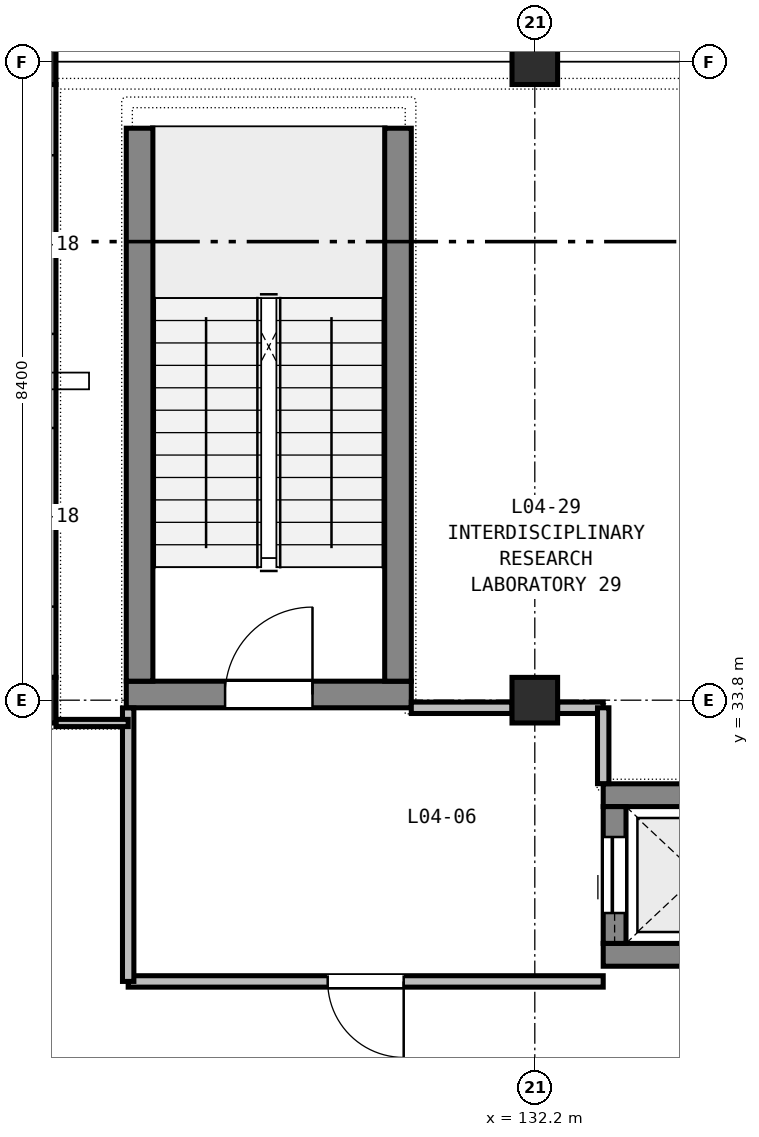
"""IFC4 building model, lengths in metres.
Left out: names, types, materials, properties, quantities, classifications, styles, units other than length and angle.
Written with IfcOpenShell. Run it as: python <this file> out.ifc"""

import sys

from ifc_helpers import new_model, si_unit, direction, frame, frame_2d, origin, origin_2d, place, context, subcontext, project, spatial, rectangle, extrude, element, fill, save


model = new_model("IFC4")
c1 = context("Model", 3, precision=1e-05, world=origin(), true_north=direction((0.0, 1.0)))
c2 = subcontext(c1, "Body", "Model", "MODEL_VIEW")
j1 = project(units=[si_unit("LENGTHUNIT", "METRE"), si_unit("PLANEANGLEUNIT", "RADIAN")], contexts=[c1])
p1 = place(None, origin())
s1 = spatial("IfcSite", under=j1, at=p1, CompositionType="ELEMENT")
p2 = place(p1, origin())
s2 = spatial("IfcBuilding", under=s1, at=p2, CompositionType="ELEMENT")
p3 = place(p2, frame((0.0, 0.0, 19.5)))
s3 = spatial("IfcBuildingStorey", under=s2, at=p3, CompositionType="ELEMENT", Elevation=19.5)
for number, where, z_axis, x_axis in (
    (1, (125.6, 33.8, 0.0), (0.0, 0.0, 1.0), (1.0, 0.0, 0.0)),
    (2, (125.6, 42.2, 0.0), (0.0, 0.0, 1.0), (1.0, 0.0, 0.0)),
    (3, (132.2, 33.8, 0.0), (0.0, 0.0, 1.0), (1.0, 0.0, 0.0)),
    (4, (132.2, 42.2, 0.0), (0.0, 0.0, 1.0), (1.0, 0.0, 0.0)),
):
    element("IfcColumn", number, at=place(p3, frame(where, z_axis=z_axis, x_axis=x_axis)), inside=s3, PredefinedType="COLUMN", context=c2, shape_type="SweptSolid", body=[
        extrude(rectangle(XDim=0.6, YDim=0.6, at=origin_2d()), origin(), (0.0, 0.0, 1.0), 4.5),
    ])
p4 = place(p3, frame((126.825, 33.875, 0.0), z_axis=(0.0, 0.0, 1.0), x_axis=(1.0, 0.0, 0.0)))
e5 = element("IfcWall", 5, at=p4, inside=s3, PredefinedType="SHEAR", context=c2, shape_type="SweptSolid", body=[
    extrude(rectangle(XDim=3.75, YDim=0.35, at=frame_2d((1.875, 0.0))), origin(), (0.0, 0.0, 1.0), 4.5),
])
p5 = place(p4, frame((1.3, 0.0, 0.0)))
e6 = element("IfcOpeningElement", 6, at=p5, cuts=e5, PredefinedType="OPENING", context=c2, shape_type="SweptSolid", body=[
    extrude(rectangle(XDim=1.15, YDim=2.15, at=frame_2d((0.575, 1.075))), frame((0.0, 0.185, 0.0), z_axis=(0.0, -1.0, 0.0), x_axis=(1.0, 0.0, 0.0)), (0.0, 0.0, 1.0), 0.37),
])
p6 = place(p3, frame((126.825, 41.5, 0.0), z_axis=(0.0, 0.0, 1.0), x_axis=(1.0, 0.0, 0.0)))
e7 = element("IfcWall", 7, at=p6, inside=s3, PredefinedType="SHEAR", context=c2, shape_type="SweptSolid", body=[
    extrude(rectangle(XDim=3.75, YDim=0.35, at=frame_2d((1.875, 0.0))), origin(), (0.0, 0.0, 1.0), 4.5),
])
for number, where, z_axis, x_axis in (
    (8, (127.0, 34.05, 0.0), (0.0, 0.0, 1.0), (0.0, 1.0, 0.0)),
    (9, (130.4, 34.05, 0.0), (0.0, 0.0, 1.0), (0.0, 1.0, 0.0)),
):
    element("IfcWall", number, at=place(p3, frame(where, z_axis=z_axis, x_axis=x_axis)), inside=s3, PredefinedType="SHEAR", context=c2, shape_type="SweptSolid", body=[
        extrude(rectangle(XDim=7.275, YDim=0.35, at=frame_2d((3.637, 0.0))), origin(), (0.0, 0.0, 1.0), 4.5),
    ])
for number, where, z_axis, x_axis in (
    (10, (133.1, 30.45, 0.0), (0.0, 0.0, 1.0), (1.0, 0.0, 0.0)),
    (11, (133.1, 32.55, 0.0), (0.0, 0.0, 1.0), (1.0, 0.0, 0.0)),
):
    element("IfcWall", number, at=place(p3, frame(where, z_axis=z_axis, x_axis=x_axis)), inside=s3, PredefinedType="SHEAR", context=c2, shape_type="SweptSolid", body=[
        extrude(rectangle(XDim=2.5, YDim=0.3, at=frame_2d((1.25, 0.0))), origin(), (0.0, 0.0, 1.0), 4.5),
    ])
p7 = place(p3, frame((133.25, 30.6, 0.0), z_axis=(0.0, 0.0, 1.0), x_axis=(0.0, 1.0, 0.0)))
e12 = element("IfcWall", 12, at=p7, inside=s3, PredefinedType="SHEAR", context=c2, shape_type="SweptSolid", body=[
    extrude(rectangle(XDim=1.8, YDim=0.3, at=frame_2d((0.9, 0.0))), origin(), (0.0, 0.0, 1.0), 4.5),
])
p8 = place(p7, frame((0.4, 0.0, 0.0)))
e13 = element("IfcOpeningElement", 13, at=p8, cuts=e12, PredefinedType="OPENING", context=c2, shape_type="SweptSolid", body=[
    extrude(rectangle(XDim=1.0, YDim=2.1, at=frame_2d((0.5, 1.05))), frame((0.0, 0.16, 0.0), z_axis=(0.0, -1.0, 0.0), x_axis=(1.0, 0.0, 0.0)), (0.0, 0.0, 1.0), 0.32),
])
p9 = place(p3, frame((125.75, 34.1, 0.0), z_axis=(0.0, 0.0, 1.0), x_axis=(0.0, 1.0, 0.0)))
e14 = element("IfcWall", 14, at=p9, inside=s3, PredefinedType="STANDARD", context=c2, shape_type="SweptSolid", body=[
    extrude(rectangle(XDim=7.8, YDim=0.3, at=frame_2d((3.9, 0.0))), origin(), (0.0, 0.0, 1.0), 3.735),
])
p10 = place(p9, frame((0.931, 0.0, 0.9)))
e15 = element("IfcOpeningElement", 15, at=p10, cuts=e14, PredefinedType="OPENING", context=c2, shape_type="SweptSolid", body=[
    extrude(rectangle(XDim=2.35, YDim=1.5, at=frame_2d((1.175, 0.75))), frame((0.0, 0.16, 0.0), z_axis=(0.0, -1.0, 0.0), x_axis=(1.0, 0.0, 0.0)), (0.0, 0.0, 1.0), 0.32),
])
p11 = place(p9, frame((4.519, 0.0, 0.9)))
e16 = element("IfcOpeningElement", 16, at=p11, cuts=e14, PredefinedType="OPENING", context=c2, shape_type="SweptSolid", body=[
    extrude(rectangle(XDim=2.35, YDim=1.5, at=frame_2d((1.175, 0.75))), frame((0.0, 0.16, 0.0), z_axis=(0.0, -1.0, 0.0), x_axis=(1.0, 0.0, 0.0)), (0.0, 0.0, 1.0), 0.32),
])
p12 = place(p3, frame((125.6, 42.05, 0.0), z_axis=(0.0, 0.0, 1.0), x_axis=(1.0, 0.0, 0.0)))
e17 = element("IfcWall", 17, at=p12, inside=s3, PredefinedType="STANDARD", context=c2, shape_type="SweptSolid", body=[
    extrude(rectangle(XDim=6.6, YDim=0.3, at=frame_2d((3.3, 0.0))), origin(), (0.0, 0.0, 1.0), 3.735),
])
p13 = place(p12, frame((1.132, 0.0, 0.75)))
e18 = element("IfcOpeningElement", 18, at=p13, cuts=e17, PredefinedType="OPENING", context=c2, shape_type="SweptSolid", body=[
    extrude(rectangle(XDim=1.3, YDim=2.4, at=frame_2d((0.65, 1.2))), frame((0.0, 0.16, 0.0), z_axis=(0.0, -1.0, 0.0), x_axis=(1.0, 0.0, 0.0)), (0.0, 0.0, 1.0), 0.32),
])
p14 = place(p12, frame((4.168, 0.0, 0.75)))
e19 = element("IfcOpeningElement", 19, at=p14, cuts=e17, PredefinedType="OPENING", context=c2, shape_type="SweptSolid", body=[
    extrude(rectangle(XDim=1.3, YDim=2.4, at=frame_2d((0.65, 1.2))), frame((0.0, 0.16, 0.0), z_axis=(0.0, -1.0, 0.0), x_axis=(1.0, 0.0, 0.0)), (0.0, 0.0, 1.0), 0.32),
])
p15 = place(p3, frame((132.2, 42.05, 0.0), z_axis=(0.0, 0.0, 1.0), x_axis=(1.0, 0.0, 0.0)))
e20 = element("IfcWall", 20, at=p15, inside=s3, PredefinedType="STANDARD", context=c2, shape_type="SweptSolid", body=[
    extrude(rectangle(XDim=3.0, YDim=0.3, at=frame_2d((1.5, 0.0))), origin(), (0.0, 0.0, 1.0), 3.735),
])
p16 = place(p3, frame((130.575, 33.7, 0.0), z_axis=(0.0, 0.0, 1.0), x_axis=(1.0, 0.0, 0.0)))
e21 = element("IfcWall", 21, at=p16, inside=s3, PredefinedType="PARTITIONING", context=c2, shape_type="SweptSolid", body=[
    extrude(rectangle(XDim=1.325, YDim=0.15, at=frame_2d((0.663, 0.0))), origin(), (0.0, 0.0, 1.0), 3.885),
])
p17 = place(p3, frame((132.5, 33.7, 0.0), z_axis=(0.0, 0.0, 1.0), x_axis=(1.0, 0.0, 0.0)))
e22 = element("IfcWall", 22, at=p17, inside=s3, PredefinedType="PARTITIONING", context=c2, shape_type="SweptSolid", body=[
    extrude(rectangle(XDim=0.6, YDim=0.15, at=frame_2d((0.3, 0.0))), origin(), (0.0, 0.0, 1.0), 3.885),
])
p18 = place(p3, frame((133.1, 33.7, 0.0), z_axis=(0.0, 0.0, 1.0), x_axis=(0.0, -1.0, 0.0)))
e23 = element("IfcWall", 23, at=p18, inside=s3, PredefinedType="PARTITIONING", context=c2, shape_type="SweptSolid", body=[
    extrude(rectangle(XDim=0.998, YDim=0.15, at=frame_2d((0.499, 0.0))), origin(), (0.0, 0.0, 1.0), 3.885),
])
p19 = place(p3, frame((133.1, 30.1, 0.0), z_axis=(0.0, 0.0, 1.0), x_axis=(-1.0, 0.0, 0.0)))
e24 = element("IfcWall", 24, at=p19, inside=s3, PredefinedType="PARTITIONING", context=c2, shape_type="SweptSolid", body=[
    extrude(rectangle(XDim=6.25, YDim=0.15, at=frame_2d((3.125, 0.0))), origin(), (0.0, 0.0, 1.0), 3.735),
])
p20 = place(p19, frame((2.625, 0.0, 0.0)))
e25 = element("IfcOpeningElement", 25, at=p20, cuts=e24, PredefinedType="OPENING", context=c2, shape_type="SweptSolid", body=[
    extrude(rectangle(XDim=1.0, YDim=2.1, at=frame_2d((0.5, 1.05))), frame((0.0, 0.085, 0.0), z_axis=(0.0, -1.0, 0.0), x_axis=(1.0, 0.0, 0.0)), (0.0, 0.0, 1.0), 0.17),
])
p21 = place(p3, frame((126.85, 30.1, 0.0), z_axis=(0.0, 0.0, 1.0), x_axis=(0.0, 1.0, 0.0)))
e26 = element("IfcWall", 26, at=p21, inside=s3, PredefinedType="PARTITIONING", context=c2, shape_type="SweptSolid", body=[
    extrude(rectangle(XDim=3.598, YDim=0.15, at=frame_2d((1.799, 0.0))), origin(), (0.0, 0.0, 1.0), 3.885),
])
p22 = place(p3, frame((126.85, 33.5, 0.0), z_axis=(0.0, 0.0, 1.0), x_axis=(-1.0, 0.0, 0.0)))
e27 = element("IfcWall", 27, at=p22, inside=s3, PredefinedType="PARTITIONING", context=c2, shape_type="SweptSolid", body=[
    extrude(rectangle(XDim=0.95, YDim=0.095, at=frame_2d((0.475, 0.0))), origin(), (0.0, 0.0, 1.0), 3.735),
])
p23 = place(p13, origin())
e28 = element("IfcWindow", 28, at=p23, inside=s3, PartitioningType="SINGLE_PANEL", PredefinedType="WINDOW", context=c2, shape_type="SweptSolid", body=[
    extrude(rectangle(XDim=1.3, YDim=2.4, at=frame_2d((0.65, 1.2))), frame((0.0, 0.03, 0.0), z_axis=(0.0, -1.0, 0.0), x_axis=(1.0, 0.0, 0.0)), (0.0, 0.0, 1.0), 0.06),
])
fill(e18, e28)
p24 = place(p14, origin())
e29 = element("IfcWindow", 29, at=p24, inside=s3, PartitioningType="SINGLE_PANEL", PredefinedType="WINDOW", context=c2, shape_type="SweptSolid", body=[
    extrude(rectangle(XDim=1.3, YDim=2.4, at=frame_2d((0.65, 1.2))), frame((0.0, 0.03, 0.0), z_axis=(0.0, -1.0, 0.0), x_axis=(1.0, 0.0, 0.0)), (0.0, 0.0, 1.0), 0.06),
])
fill(e19, e29)
p25 = place(p5, origin())
e30 = element("IfcDoor", 30, at=p25, inside=s3, OperationType="SINGLE_SWING_RIGHT", PredefinedType="DOOR", context=c2, shape_type="SweptSolid", body=[
    extrude(rectangle(XDim=1.15, YDim=2.15, at=frame_2d((0.575, 1.075))), frame((0.0, 0.025, 0.0), z_axis=(0.0, -1.0, 0.0), x_axis=(1.0, 0.0, 0.0)), (0.0, 0.0, 1.0), 0.05),
])
fill(e6, e30)
p26 = place(p8, origin())
e31 = element("IfcDoor", 31, at=p26, inside=s3, OperationType="SLIDING_TO_LEFT", PredefinedType="DOOR", context=c2, shape_type="SweptSolid", body=[
    extrude(rectangle(XDim=1.0, YDim=2.1, at=frame_2d((0.5, 1.05))), frame((0.0, 0.025, 0.0), z_axis=(0.0, -1.0, 0.0), x_axis=(1.0, 0.0, 0.0)), (0.0, 0.0, 1.0), 0.05),
])
fill(e13, e31)
p27 = place(p20, origin())
e32 = element("IfcDoor", 32, at=p27, inside=s3, OperationType="SINGLE_SWING_LEFT", PredefinedType="DOOR", context=c2, shape_type="SweptSolid", body=[
    extrude(rectangle(XDim=1.0, YDim=2.1, at=frame_2d((0.5, 1.05))), frame((0.0, 0.025, 0.0), z_axis=(0.0, -1.0, 0.0), x_axis=(1.0, 0.0, 0.0)), (0.0, 0.0, 1.0), 0.05),
])
fill(e25, e32)
save(model, sys.argv[1])
